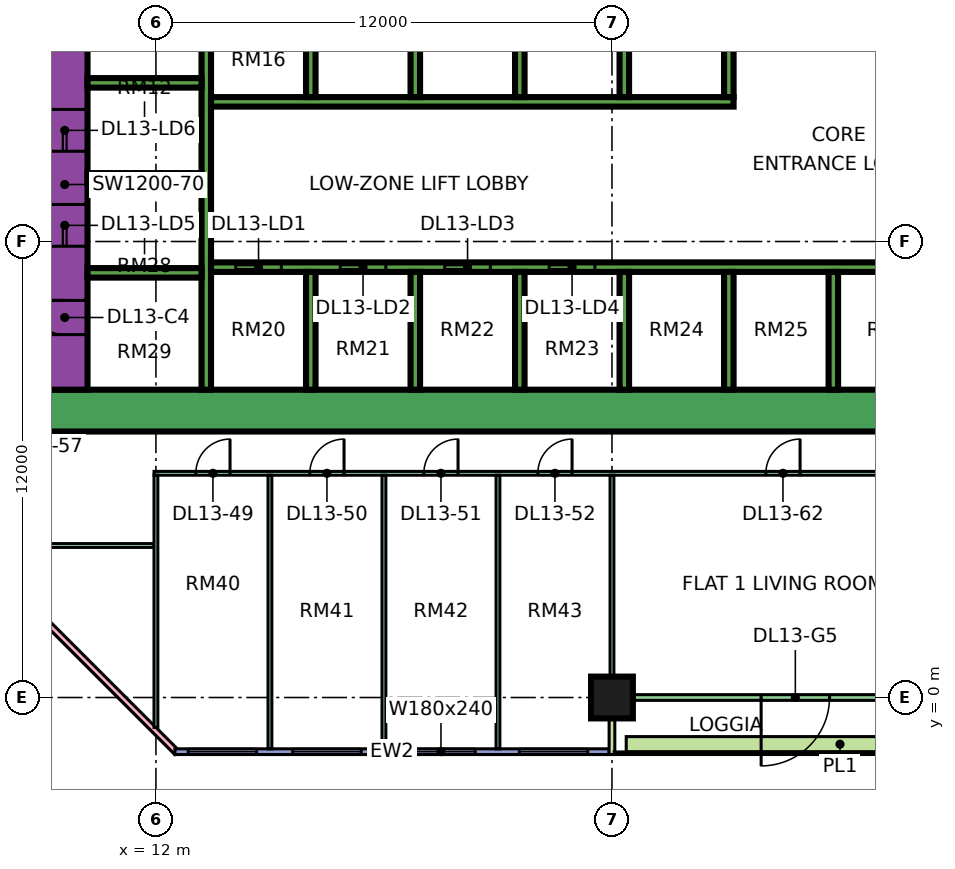
"""IFC4 building model, lengths in metres.
Left out: names, types, materials, properties, quantities, classifications, styles, units other than length and angle.
Written with IfcOpenShell. Run it as: python <this file> out.ifc"""

import sys

from ifc_helpers import new_model, si_unit, direction, frame, frame_2d, origin, origin_2d, place, context, subcontext, project, spatial, rectangle, extrude, element, fill, save


model = new_model("IFC4")
c1 = context("Model", 3, precision=1e-05, world=origin(), true_north=direction((0.0, 1.0)))
c2 = subcontext(c1, "Body", "Model", "MODEL_VIEW")
j1 = project(units=[si_unit("LENGTHUNIT", "METRE"), si_unit("PLANEANGLEUNIT", "RADIAN")], contexts=[c1])
p1 = place(None, origin())
s1 = spatial("IfcSite", under=j1, at=p1, CompositionType="ELEMENT")
p2 = place(p1, origin())
s2 = spatial("IfcBuilding", under=s1, at=p2, CompositionType="ELEMENT")
p3 = place(p2, frame((0.0, 0.0, 63.9)))
s3 = spatial("IfcBuildingStorey", under=s2, at=p3, CompositionType="ELEMENT", Elevation=63.9)
p4 = place(p3, frame((24.0, 0.0, 0.0), z_axis=(0.0, 0.0, 1.0), x_axis=(1.0, 0.0, 0.0)))
e1 = element("IfcColumn", 1, at=p4, inside=s3, PredefinedType="COLUMN", context=c2, shape_type="SweptSolid", body=[
    extrude(rectangle(XDim=1.1, YDim=1.1, at=origin_2d()), origin(), (0.0, 0.0, 1.0), 3.75),
])
p5 = place(p3, frame((9.0, 7.55, 0.0), z_axis=(0.0, 0.0, 1.0), x_axis=(1.0, 0.0, 0.0)))
e2 = element("IfcWall", 2, at=p5, inside=s3, PredefinedType="SHEAR", context=c2, shape_type="SweptSolid", body=[
    extrude(rectangle(XDim=25.0, YDim=1.1, at=frame_2d((12.5, 0.0))), origin(), (0.0, 0.0, 1.0), 3.75),
])
p6 = place(p3, frame((9.6, 8.1, 0.0), z_axis=(0.0, 0.0, 1.0), x_axis=(0.0, 1.0, 0.0)))
e3 = element("IfcWall", 3, at=p6, inside=s3, PredefinedType="SHEAR", context=c2, shape_type="SweptSolid", body=[
    extrude(rectangle(XDim=10.8, YDim=1.2, at=frame_2d((5.4, 0.0))), origin(), (0.0, 0.0, 1.0), 3.75),
])
p7 = place(p6, frame((3.775, 0.0, 0.0)))
e4 = element("IfcOpeningElement", 4, at=p7, cuts=e3, PredefinedType="OPENING", context=c2, shape_type="SweptSolid", body=[
    extrude(rectangle(XDim=1.1, YDim=2.2, at=frame_2d((0.55, 1.1))), frame((0.0, 0.61, 0.0), z_axis=(0.0, -1.0, 0.0), x_axis=(1.0, 0.0, 0.0)), (0.0, 0.0, 1.0), 1.22),
])
p8 = place(p6, frame((6.275, 0.0, 0.0)))
e5 = element("IfcOpeningElement", 5, at=p8, cuts=e3, PredefinedType="OPENING", context=c2, shape_type="SweptSolid", body=[
    extrude(rectangle(XDim=1.1, YDim=2.2, at=frame_2d((0.55, 1.1))), frame((0.0, 0.61, 0.0), z_axis=(0.0, -1.0, 0.0), x_axis=(1.0, 0.0, 0.0)), (0.0, 0.0, 1.0), 1.22),
])
p9 = place(p6, frame((8.95, 0.0, 0.0)))
e6 = element("IfcOpeningElement", 6, at=p9, cuts=e3, PredefinedType="OPENING", context=c2, shape_type="SweptSolid", body=[
    extrude(rectangle(XDim=1.1, YDim=2.2, at=frame_2d((0.55, 1.1))), frame((0.0, 0.61, 0.0), z_axis=(0.0, -1.0, 0.0), x_axis=(1.0, 0.0, 0.0)), (0.0, 0.0, 1.0), 1.22),
])
p10 = place(p6, frame((1.45, 0.0, 0.0)))
e7 = element("IfcOpeningElement", 7, at=p10, cuts=e3, PredefinedType="OPENING", context=c2, shape_type="SweptSolid", body=[
    extrude(rectangle(XDim=0.9, YDim=2.1, at=frame_2d((0.45, 1.05))), frame((0.0, 0.61, 0.0), z_axis=(0.0, -1.0, 0.0), x_axis=(1.0, 0.0, 0.0)), (0.0, 0.0, 1.0), 1.22),
])
p11 = place(p3, frame((13.325, 8.1, 0.0), z_axis=(0.0, 0.0, 1.0), x_axis=(0.0, 1.0, 0.0)))
e8 = element("IfcWall", 8, at=p11, inside=s3, PredefinedType="SHEAR", context=c2, shape_type="SweptSolid", body=[
    extrude(rectangle(XDim=10.8, YDim=0.25, at=frame_2d((5.4, 0.0))), origin(), (0.0, 0.0, 1.0), 3.75),
])
p12 = place(p3, frame((13.45, 11.325, 0.0), z_axis=(0.0, 0.0, 1.0), x_axis=(1.0, 0.0, 0.0)))
e9 = element("IfcWall", 9, at=p12, inside=s3, PredefinedType="SHEAR", context=c2, shape_type="SweptSolid", body=[
    extrude(rectangle(XDim=19.45, YDim=0.25, at=frame_2d((9.725, 0.0))), origin(), (0.0, 0.0, 1.0), 3.75),
])
p13 = place(p12, frame((0.65, 0.0, 0.0)))
e10 = element("IfcOpeningElement", 10, at=p13, cuts=e9, PredefinedType="OPENING", context=c2, shape_type="SweptSolid", body=[
    extrude(rectangle(XDim=1.2, YDim=2.2, at=frame_2d((0.6, 1.1))), frame((0.0, 0.135, 0.0), z_axis=(0.0, -1.0, 0.0), x_axis=(1.0, 0.0, 0.0)), (0.0, 0.0, 1.0), 0.27),
])
p14 = place(p12, frame((3.4, 0.0, 0.0)))
e11 = element("IfcOpeningElement", 11, at=p14, cuts=e9, PredefinedType="OPENING", context=c2, shape_type="SweptSolid", body=[
    extrude(rectangle(XDim=1.2, YDim=2.2, at=frame_2d((0.6, 1.1))), frame((0.0, 0.135, 0.0), z_axis=(0.0, -1.0, 0.0), x_axis=(1.0, 0.0, 0.0)), (0.0, 0.0, 1.0), 0.27),
])
p15 = place(p12, frame((6.15, 0.0, 0.0)))
e12 = element("IfcOpeningElement", 12, at=p15, cuts=e9, PredefinedType="OPENING", context=c2, shape_type="SweptSolid", body=[
    extrude(rectangle(XDim=1.2, YDim=2.2, at=frame_2d((0.6, 1.1))), frame((0.0, 0.135, 0.0), z_axis=(0.0, -1.0, 0.0), x_axis=(1.0, 0.0, 0.0)), (0.0, 0.0, 1.0), 0.27),
])
p16 = place(p12, frame((8.9, 0.0, 0.0)))
e13 = element("IfcOpeningElement", 13, at=p16, cuts=e9, PredefinedType="OPENING", context=c2, shape_type="SweptSolid", body=[
    extrude(rectangle(XDim=1.2, YDim=2.2, at=frame_2d((0.6, 1.1))), frame((0.0, 0.135, 0.0), z_axis=(0.0, -1.0, 0.0), x_axis=(1.0, 0.0, 0.0)), (0.0, 0.0, 1.0), 0.27),
])
p17 = place(p3, frame((13.45, 15.675, 0.0), z_axis=(0.0, 0.0, 1.0), x_axis=(1.0, 0.0, 0.0)))
e14 = element("IfcWall", 14, at=p17, inside=s3, PredefinedType="SHEAR", context=c2, shape_type="SweptSolid", body=[
    extrude(rectangle(XDim=13.75, YDim=0.25, at=frame_2d((6.875, 0.0))), origin(), (0.0, 0.0, 1.0), 3.75),
])
for number, where, z_axis, x_axis in (
    (15, (10.2, 11.175, 0.0), (0.0, 0.0, 1.0), (1.0, 0.0, 0.0)),
    (16, (10.2, 13.675, 0.0), (0.0, 0.0, 1.0), (1.0, 0.0, 0.0)),
    (17, (10.2, 16.175, 0.0), (0.0, 0.0, 1.0), (1.0, 0.0, 0.0)),
):
    element("IfcWall", number, at=place(p3, frame(where, z_axis=z_axis, x_axis=x_axis)), inside=s3, PredefinedType="SHEAR", context=c2, shape_type="SweptSolid", body=[
        extrude(rectangle(XDim=3.0, YDim=0.25, at=frame_2d((1.5, 0.0))), origin(), (0.0, 0.0, 1.0), 3.75),
    ])
for number, where, z_axis, x_axis in (
    (18, (16.075, 8.1, 0.0), (0.0, 0.0, 1.0), (0.0, 1.0, 0.0)),
    (19, (18.825, 8.1, 0.0), (0.0, 0.0, 1.0), (0.0, 1.0, 0.0)),
    (20, (21.575, 8.1, 0.0), (0.0, 0.0, 1.0), (0.0, 1.0, 0.0)),
    (21, (24.325, 8.1, 0.0), (0.0, 0.0, 1.0), (0.0, 1.0, 0.0)),
    (22, (27.075, 8.1, 0.0), (0.0, 0.0, 1.0), (0.0, 1.0, 0.0)),
    (23, (29.825, 8.1, 0.0), (0.0, 0.0, 1.0), (0.0, 1.0, 0.0)),
    (24, (16.075, 15.8, 0.0), (0.0, 0.0, 1.0), (0.0, 1.0, 0.0)),
    (25, (18.825, 15.8, 0.0), (0.0, 0.0, 1.0), (0.0, 1.0, 0.0)),
    (26, (21.575, 15.8, 0.0), (0.0, 0.0, 1.0), (0.0, 1.0, 0.0)),
    (27, (24.325, 15.8, 0.0), (0.0, 0.0, 1.0), (0.0, 1.0, 0.0)),
    (28, (27.075, 15.8, 0.0), (0.0, 0.0, 1.0), (0.0, 1.0, 0.0)),
):
    element("IfcWall", number, at=place(p3, frame(where, z_axis=z_axis, x_axis=x_axis)), inside=s3, PredefinedType="SHEAR", context=c2, shape_type="SweptSolid", body=[
        extrude(rectangle(XDim=3.1, YDim=0.25, at=frame_2d((1.55, 0.0))), origin(), (0.0, 0.0, 1.0), 3.75),
    ])
p18 = place(p3, frame((-1.447, 12.553, 0.0), z_axis=(0.0, 0.0, 1.0), x_axis=(0.707106781187, -0.707106781187, 0.0)))
e29 = element("IfcWall", 29, at=p18, inside=s3, PredefinedType="SOLIDWALL", context=c2, shape_type="SweptSolid", body=[
    extrude(rectangle(XDim=19.799, YDim=0.15, at=frame_2d((9.899, 0.0))), origin(), (0.0, 0.0, 1.0), 3.35),
])
p19 = place(p18, frame((2.212, 0.0, 0.45)))
e30 = element("IfcOpeningElement", 30, at=p19, cuts=e29, PredefinedType="OPENING", context=c2, shape_type="SweptSolid", body=[
    extrude(rectangle(XDim=3.0, YDim=2.4, at=frame_2d((1.5, 1.2))), frame((0.0, 0.085, 0.0), z_axis=(0.0, -1.0, 0.0), x_axis=(1.0, 0.0, 0.0)), (0.0, 0.0, 1.0), 0.17),
])
p20 = place(p18, frame((10.216, 0.0, 0.45)))
e31 = element("IfcOpeningElement", 31, at=p20, cuts=e29, PredefinedType="OPENING", context=c2, shape_type="SweptSolid", body=[
    extrude(rectangle(XDim=3.0, YDim=2.4, at=frame_2d((1.5, 1.2))), frame((0.0, 0.085, 0.0), z_axis=(0.0, -1.0, 0.0), x_axis=(1.0, 0.0, 0.0)), (0.0, 0.0, 1.0), 0.17),
])
p21 = place(p3, frame((12.5, -1.425, 0.0), z_axis=(0.0, 0.0, 1.0), x_axis=(1.0, 0.0, 0.0)))
e32 = element("IfcWall", 32, at=p21, inside=s3, PredefinedType="SOLIDWALL", context=c2, shape_type="SweptSolid", body=[
    extrude(rectangle(XDim=11.425, YDim=0.15, at=frame_2d((5.712, 0.0))), origin(), (0.0, 0.0, 1.0), 3.35),
])
p22 = place(p21, frame((0.35, 0.0, 0.45)))
e33 = element("IfcOpeningElement", 33, at=p22, cuts=e32, PredefinedType="OPENING", context=c2, shape_type="SweptSolid", body=[
    extrude(rectangle(XDim=1.8, YDim=2.4, at=frame_2d((0.9, 1.2))), frame((0.0, 0.085, 0.0), z_axis=(0.0, -1.0, 0.0), x_axis=(1.0, 0.0, 0.0)), (0.0, 0.0, 1.0), 0.17),
])
p23 = place(p21, frame((3.1, 0.0, 0.45)))
e34 = element("IfcOpeningElement", 34, at=p23, cuts=e32, PredefinedType="OPENING", context=c2, shape_type="SweptSolid", body=[
    extrude(rectangle(XDim=1.8, YDim=2.4, at=frame_2d((0.9, 1.2))), frame((0.0, 0.085, 0.0), z_axis=(0.0, -1.0, 0.0), x_axis=(1.0, 0.0, 0.0)), (0.0, 0.0, 1.0), 0.17),
])
p24 = place(p21, frame((6.1, 0.0, 0.45)))
e35 = element("IfcOpeningElement", 35, at=p24, cuts=e32, PredefinedType="OPENING", context=c2, shape_type="SweptSolid", body=[
    extrude(rectangle(XDim=1.8, YDim=2.4, at=frame_2d((0.9, 1.2))), frame((0.0, 0.085, 0.0), z_axis=(0.0, -1.0, 0.0), x_axis=(1.0, 0.0, 0.0)), (0.0, 0.0, 1.0), 0.17),
])
p25 = place(p21, frame((9.062, 0.0, 0.45)))
e36 = element("IfcOpeningElement", 36, at=p25, cuts=e32, PredefinedType="OPENING", context=c2, shape_type="SweptSolid", body=[
    extrude(rectangle(XDim=1.8, YDim=2.4, at=frame_2d((0.9, 1.2))), frame((0.0, 0.085, 0.0), z_axis=(0.0, -1.0, 0.0), x_axis=(1.0, 0.0, 0.0)), (0.0, 0.0, 1.0), 0.17),
])
p26 = place(p3, frame((24.075, 0.0, 0.0), z_axis=(0.0, 0.0, 1.0), x_axis=(1.0, 0.0, 0.0)))
e37 = element("IfcWall", 37, at=p26, inside=s3, PredefinedType="SOLIDWALL", context=c2, shape_type="SweptSolid", body=[
    extrude(rectangle(XDim=11.85, YDim=0.15, at=frame_2d((5.925, 0.0))), origin(), (0.0, 0.0, 1.0), 3.35),
])
p27 = place(p26, frame((3.85, 0.0, 0.0)))
e38 = element("IfcOpeningElement", 38, at=p27, cuts=e37, PredefinedType="OPENING", context=c2, shape_type="SweptSolid", body=[
    extrude(rectangle(XDim=1.8, YDim=2.4, at=frame_2d((0.9, 1.2))), frame((0.0, 0.085, 0.0), z_axis=(0.0, -1.0, 0.0), x_axis=(1.0, 0.0, 0.0)), (0.0, 0.0, 1.0), 0.17),
])
p28 = place(p26, frame((9.5, 0.0, 0.45)))
e39 = element("IfcOpeningElement", 39, at=p28, cuts=e37, PredefinedType="OPENING", context=c2, shape_type="SweptSolid", body=[
    extrude(rectangle(XDim=1.2, YDim=2.4, at=frame_2d((0.6, 1.2))), frame((0.0, 0.085, 0.0), z_axis=(0.0, -1.0, 0.0), x_axis=(1.0, 0.0, 0.0)), (0.0, 0.0, 1.0), 0.17),
])
p29 = place(p3, frame((24.0, -1.5, 0.0), z_axis=(0.0, 0.0, 1.0), x_axis=(0.0, 1.0, 0.0)))
e40 = element("IfcWall", 40, at=p29, inside=s3, PredefinedType="SOLIDWALL", context=c2, shape_type="SweptSolid", body=[
    extrude(rectangle(XDim=1.5, YDim=0.15, at=frame_2d((0.75, 0.0))), origin(), (0.0, 0.0, 1.0), 3.35),
])
p30 = place(p3, frame((24.375, -1.229, 0.0), z_axis=(0.0, 0.0, 1.0), x_axis=(1.0, 0.0, 0.0)))
e41 = element("IfcWall", 41, at=p30, inside=s3, PredefinedType="SOLIDWALL", context=c2, shape_type="SweptSolid", body=[
    extrude(rectangle(XDim=11.25, YDim=0.4, at=frame_2d((5.625, 0.0))), origin(), (0.0, 0.0, 1.0), 0.7),
])
p31 = place(p3, frame((9.05, 4.0, 0.0), z_axis=(0.0, 0.0, 1.0), x_axis=(1.0, 0.0, 0.0)))
e42 = element("IfcWall", 42, at=p31, inside=s3, PredefinedType="PARTITIONING", context=c2, shape_type="SweptSolid", body=[
    extrude(rectangle(XDim=2.9, YDim=0.1, at=frame_2d((1.45, 0.0))), origin(), (0.0, 0.0, 1.0), 3.35),
])
p32 = place(p3, frame((11.95, 5.9, 0.0), z_axis=(0.0, 0.0, 1.0), x_axis=(1.0, 0.0, 0.0)))
e43 = element("IfcWall", 43, at=p32, inside=s3, PredefinedType="PARTITIONING", context=c2, shape_type="SweptSolid", body=[
    extrude(rectangle(XDim=21.1, YDim=0.1, at=frame_2d((10.55, 0.0))), origin(), (0.0, 0.0, 1.0), 3.35),
])
p33 = place(p32, frame((1.1, 0.0, 0.0)))
e44 = element("IfcOpeningElement", 44, at=p33, cuts=e43, PredefinedType="OPENING", context=c2, shape_type="SweptSolid", body=[
    extrude(rectangle(XDim=0.9, YDim=2.1, at=frame_2d((0.45, 1.05))), frame((0.0, 0.06, 0.0), z_axis=(0.0, -1.0, 0.0), x_axis=(1.0, 0.0, 0.0)), (0.0, 0.0, 1.0), 0.12),
])
p34 = place(p32, frame((4.1, 0.0, 0.0)))
e45 = element("IfcOpeningElement", 45, at=p34, cuts=e43, PredefinedType="OPENING", context=c2, shape_type="SweptSolid", body=[
    extrude(rectangle(XDim=0.9, YDim=2.1, at=frame_2d((0.45, 1.05))), frame((0.0, 0.06, 0.0), z_axis=(0.0, -1.0, 0.0), x_axis=(1.0, 0.0, 0.0)), (0.0, 0.0, 1.0), 0.12),
])
p35 = place(p32, frame((7.1, 0.0, 0.0)))
e46 = element("IfcOpeningElement", 46, at=p35, cuts=e43, PredefinedType="OPENING", context=c2, shape_type="SweptSolid", body=[
    extrude(rectangle(XDim=0.9, YDim=2.1, at=frame_2d((0.45, 1.05))), frame((0.0, 0.06, 0.0), z_axis=(0.0, -1.0, 0.0), x_axis=(1.0, 0.0, 0.0)), (0.0, 0.0, 1.0), 0.12),
])
p36 = place(p32, frame((10.1, 0.0, 0.0)))
e47 = element("IfcOpeningElement", 47, at=p36, cuts=e43, PredefinedType="OPENING", context=c2, shape_type="SweptSolid", body=[
    extrude(rectangle(XDim=0.9, YDim=2.1, at=frame_2d((0.45, 1.05))), frame((0.0, 0.06, 0.0), z_axis=(0.0, -1.0, 0.0), x_axis=(1.0, 0.0, 0.0)), (0.0, 0.0, 1.0), 0.12),
])
p37 = place(p32, frame((16.1, 0.0, 0.0)))
e48 = element("IfcOpeningElement", 48, at=p37, cuts=e43, PredefinedType="OPENING", context=c2, shape_type="SweptSolid", body=[
    extrude(rectangle(XDim=0.9, YDim=2.1, at=frame_2d((0.45, 1.05))), frame((0.0, 0.06, 0.0), z_axis=(0.0, -1.0, 0.0), x_axis=(1.0, 0.0, 0.0)), (0.0, 0.0, 1.0), 0.12),
])
p38 = place(p3, frame((12.0, -0.788, 0.0), z_axis=(0.0, 0.0, 1.0), x_axis=(0.0, 1.0, 0.0)))
e49 = element("IfcWall", 49, at=p38, inside=s3, PredefinedType="PARTITIONING", context=c2, shape_type="SweptSolid", body=[
    extrude(rectangle(XDim=6.638, YDim=0.1, at=frame_2d((3.319, 0.0))), origin(), (0.0, 0.0, 1.0), 3.35),
])
for number, where, z_axis, x_axis in (
    (50, (15.0, -1.351, 0.0), (0.0, 0.0, 1.0), (0.0, 1.0, 0.0)),
    (51, (18.0, -1.351, 0.0), (0.0, 0.0, 1.0), (0.0, 1.0, 0.0)),
    (52, (21.0, -1.351, 0.0), (0.0, 0.0, 1.0), (0.0, 1.0, 0.0)),
):
    element("IfcWall", number, at=place(p3, frame(where, z_axis=z_axis, x_axis=x_axis)), inside=s3, PredefinedType="PARTITIONING", context=c2, shape_type="SweptSolid", body=[
        extrude(rectangle(XDim=7.201, YDim=0.1, at=frame_2d((3.601, 0.0))), origin(), (0.0, 0.0, 1.0), 3.35),
    ])
p39 = place(p3, frame((24.0, 0.0, 0.0), z_axis=(0.0, 0.0, 1.0), x_axis=(0.0, 1.0, 0.0)))
e53 = element("IfcWall", 53, at=p39, inside=s3, PredefinedType="PARTITIONING", context=c2, shape_type="SweptSolid", body=[
    extrude(rectangle(XDim=5.85, YDim=0.1, at=frame_2d((2.925, 0.0))), origin(), (0.0, 0.0, 1.0), 3.35),
])
p40 = place(p22, origin())
e54 = element("IfcWindow", 54, at=p40, inside=s3, PartitioningType="SINGLE_PANEL", PredefinedType="WINDOW", context=c2, shape_type="SweptSolid", body=[
    extrude(rectangle(XDim=1.8, YDim=2.4, at=frame_2d((0.9, 1.2))), frame((0.0, 0.03, 0.0), z_axis=(0.0, -1.0, 0.0), x_axis=(1.0, 0.0, 0.0)), (0.0, 0.0, 1.0), 0.06),
])
fill(e33, e54)
p41 = place(p23, origin())
e55 = element("IfcWindow", 55, at=p41, inside=s3, PartitioningType="SINGLE_PANEL", PredefinedType="WINDOW", context=c2, shape_type="SweptSolid", body=[
    extrude(rectangle(XDim=1.8, YDim=2.4, at=frame_2d((0.9, 1.2))), frame((0.0, 0.03, 0.0), z_axis=(0.0, -1.0, 0.0), x_axis=(1.0, 0.0, 0.0)), (0.0, 0.0, 1.0), 0.06),
])
fill(e34, e55)
p42 = place(p24, origin())
e56 = element("IfcWindow", 56, at=p42, inside=s3, PartitioningType="SINGLE_PANEL", PredefinedType="WINDOW", context=c2, shape_type="SweptSolid", body=[
    extrude(rectangle(XDim=1.8, YDim=2.4, at=frame_2d((0.9, 1.2))), frame((0.0, 0.03, 0.0), z_axis=(0.0, -1.0, 0.0), x_axis=(1.0, 0.0, 0.0)), (0.0, 0.0, 1.0), 0.06),
])
fill(e35, e56)
p43 = place(p25, origin())
e57 = element("IfcWindow", 57, at=p43, inside=s3, PartitioningType="SINGLE_PANEL", PredefinedType="WINDOW", context=c2, shape_type="SweptSolid", body=[
    extrude(rectangle(XDim=1.8, YDim=2.4, at=frame_2d((0.9, 1.2))), frame((0.0, 0.03, 0.0), z_axis=(0.0, -1.0, 0.0), x_axis=(1.0, 0.0, 0.0)), (0.0, 0.0, 1.0), 0.06),
])
fill(e36, e57)
p44 = place(p27, frame((1.8, 0.0, 0.0), z_axis=(0.0, 0.0, 1.0), x_axis=(-1.0, 0.0, 0.0)))
e58 = element("IfcDoor", 58, at=p44, inside=s3, OperationType="DOUBLE_DOOR_SINGLE_SWING", PredefinedType="DOOR", context=c2, shape_type="SweptSolid", body=[
    extrude(rectangle(XDim=1.8, YDim=2.4, at=frame_2d((0.9, 1.2))), frame((0.0, 0.025, 0.0), z_axis=(0.0, -1.0, 0.0), x_axis=(1.0, 0.0, 0.0)), (0.0, 0.0, 1.0), 0.05),
])
fill(e38, e58)
p45 = place(p13, origin())
e59 = element("IfcDoor", 59, at=p45, inside=s3, OperationType="DOUBLE_DOOR_SLIDING", PredefinedType="DOOR", context=c2, shape_type="SweptSolid", body=[
    extrude(rectangle(XDim=1.2, YDim=2.2, at=frame_2d((0.6, 1.1))), frame((0.0, 0.025, 0.0), z_axis=(0.0, -1.0, 0.0), x_axis=(1.0, 0.0, 0.0)), (0.0, 0.0, 1.0), 0.05),
])
fill(e10, e59)
p46 = place(p14, origin())
e60 = element("IfcDoor", 60, at=p46, inside=s3, OperationType="DOUBLE_DOOR_SLIDING", PredefinedType="DOOR", context=c2, shape_type="SweptSolid", body=[
    extrude(rectangle(XDim=1.2, YDim=2.2, at=frame_2d((0.6, 1.1))), frame((0.0, 0.025, 0.0), z_axis=(0.0, -1.0, 0.0), x_axis=(1.0, 0.0, 0.0)), (0.0, 0.0, 1.0), 0.05),
])
fill(e11, e60)
p47 = place(p15, origin())
e61 = element("IfcDoor", 61, at=p47, inside=s3, OperationType="DOUBLE_DOOR_SLIDING", PredefinedType="DOOR", context=c2, shape_type="SweptSolid", body=[
    extrude(rectangle(XDim=1.2, YDim=2.2, at=frame_2d((0.6, 1.1))), frame((0.0, 0.025, 0.0), z_axis=(0.0, -1.0, 0.0), x_axis=(1.0, 0.0, 0.0)), (0.0, 0.0, 1.0), 0.05),
])
fill(e12, e61)
p48 = place(p16, origin())
e62 = element("IfcDoor", 62, at=p48, inside=s3, OperationType="DOUBLE_DOOR_SLIDING", PredefinedType="DOOR", context=c2, shape_type="SweptSolid", body=[
    extrude(rectangle(XDim=1.2, YDim=2.2, at=frame_2d((0.6, 1.1))), frame((0.0, 0.025, 0.0), z_axis=(0.0, -1.0, 0.0), x_axis=(1.0, 0.0, 0.0)), (0.0, 0.0, 1.0), 0.05),
])
fill(e13, e62)
p49 = place(p7, origin())
e63 = element("IfcDoor", 63, at=p49, inside=s3, OperationType="DOUBLE_DOOR_SLIDING", PredefinedType="DOOR", context=c2, shape_type="SweptSolid", body=[
    extrude(rectangle(XDim=1.1, YDim=2.2, at=frame_2d((0.55, 1.1))), frame((0.0, 0.025, 0.0), z_axis=(0.0, -1.0, 0.0), x_axis=(1.0, 0.0, 0.0)), (0.0, 0.0, 1.0), 0.05),
])
fill(e4, e63)
p50 = place(p8, origin())
e64 = element("IfcDoor", 64, at=p50, inside=s3, OperationType="DOUBLE_DOOR_SLIDING", PredefinedType="DOOR", context=c2, shape_type="SweptSolid", body=[
    extrude(rectangle(XDim=1.1, YDim=2.2, at=frame_2d((0.55, 1.1))), frame((0.0, 0.025, 0.0), z_axis=(0.0, -1.0, 0.0), x_axis=(1.0, 0.0, 0.0)), (0.0, 0.0, 1.0), 0.05),
])
fill(e5, e64)
p51 = place(p10, frame((0.9, 0.0, 0.0), z_axis=(0.0, 0.0, 1.0), x_axis=(-1.0, 0.0, 0.0)))
e65 = element("IfcDoor", 65, at=p51, inside=s3, OperationType="SINGLE_SWING_RIGHT", PredefinedType="DOOR", context=c2, shape_type="SweptSolid", body=[
    extrude(rectangle(XDim=0.9, YDim=2.1, at=frame_2d((0.45, 1.05))), frame((0.0, 0.025, 0.0), z_axis=(0.0, -1.0, 0.0), x_axis=(1.0, 0.0, 0.0)), (0.0, 0.0, 1.0), 0.05),
])
fill(e7, e65)
p52 = place(p33, frame((0.9, 0.0, 0.0), z_axis=(0.0, 0.0, 1.0), x_axis=(-1.0, 0.0, 0.0)))
e66 = element("IfcDoor", 66, at=p52, inside=s3, OperationType="SINGLE_SWING_RIGHT", PredefinedType="DOOR", context=c2, shape_type="SweptSolid", body=[
    extrude(rectangle(XDim=0.9, YDim=2.1, at=frame_2d((0.45, 1.05))), frame((0.0, 0.025, 0.0), z_axis=(0.0, -1.0, 0.0), x_axis=(1.0, 0.0, 0.0)), (0.0, 0.0, 1.0), 0.05),
])
fill(e44, e66)
p53 = place(p34, frame((0.9, 0.0, 0.0), z_axis=(0.0, 0.0, 1.0), x_axis=(-1.0, 0.0, 0.0)))
e67 = element("IfcDoor", 67, at=p53, inside=s3, OperationType="SINGLE_SWING_RIGHT", PredefinedType="DOOR", context=c2, shape_type="SweptSolid", body=[
    extrude(rectangle(XDim=0.9, YDim=2.1, at=frame_2d((0.45, 1.05))), frame((0.0, 0.025, 0.0), z_axis=(0.0, -1.0, 0.0), x_axis=(1.0, 0.0, 0.0)), (0.0, 0.0, 1.0), 0.05),
])
fill(e45, e67)
p54 = place(p35, frame((0.9, 0.0, 0.0), z_axis=(0.0, 0.0, 1.0), x_axis=(-1.0, 0.0, 0.0)))
e68 = element("IfcDoor", 68, at=p54, inside=s3, OperationType="SINGLE_SWING_RIGHT", PredefinedType="DOOR", context=c2, shape_type="SweptSolid", body=[
    extrude(rectangle(XDim=0.9, YDim=2.1, at=frame_2d((0.45, 1.05))), frame((0.0, 0.025, 0.0), z_axis=(0.0, -1.0, 0.0), x_axis=(1.0, 0.0, 0.0)), (0.0, 0.0, 1.0), 0.05),
])
fill(e46, e68)
p55 = place(p36, frame((0.9, 0.0, 0.0), z_axis=(0.0, 0.0, 1.0), x_axis=(-1.0, 0.0, 0.0)))
e69 = element("IfcDoor", 69, at=p55, inside=s3, OperationType="SINGLE_SWING_RIGHT", PredefinedType="DOOR", context=c2, shape_type="SweptSolid", body=[
    extrude(rectangle(XDim=0.9, YDim=2.1, at=frame_2d((0.45, 1.05))), frame((0.0, 0.025, 0.0), z_axis=(0.0, -1.0, 0.0), x_axis=(1.0, 0.0, 0.0)), (0.0, 0.0, 1.0), 0.05),
])
fill(e47, e69)
p56 = place(p37, frame((0.9, 0.0, 0.0), z_axis=(0.0, 0.0, 1.0), x_axis=(-1.0, 0.0, 0.0)))
e70 = element("IfcDoor", 70, at=p56, inside=s3, OperationType="SINGLE_SWING_RIGHT", PredefinedType="DOOR", context=c2, shape_type="SweptSolid", body=[
    extrude(rectangle(XDim=0.9, YDim=2.1, at=frame_2d((0.45, 1.05))), frame((0.0, 0.025, 0.0), z_axis=(0.0, -1.0, 0.0), x_axis=(1.0, 0.0, 0.0)), (0.0, 0.0, 1.0), 0.05),
])
fill(e48, e70)
save(model, sys.argv[1])
